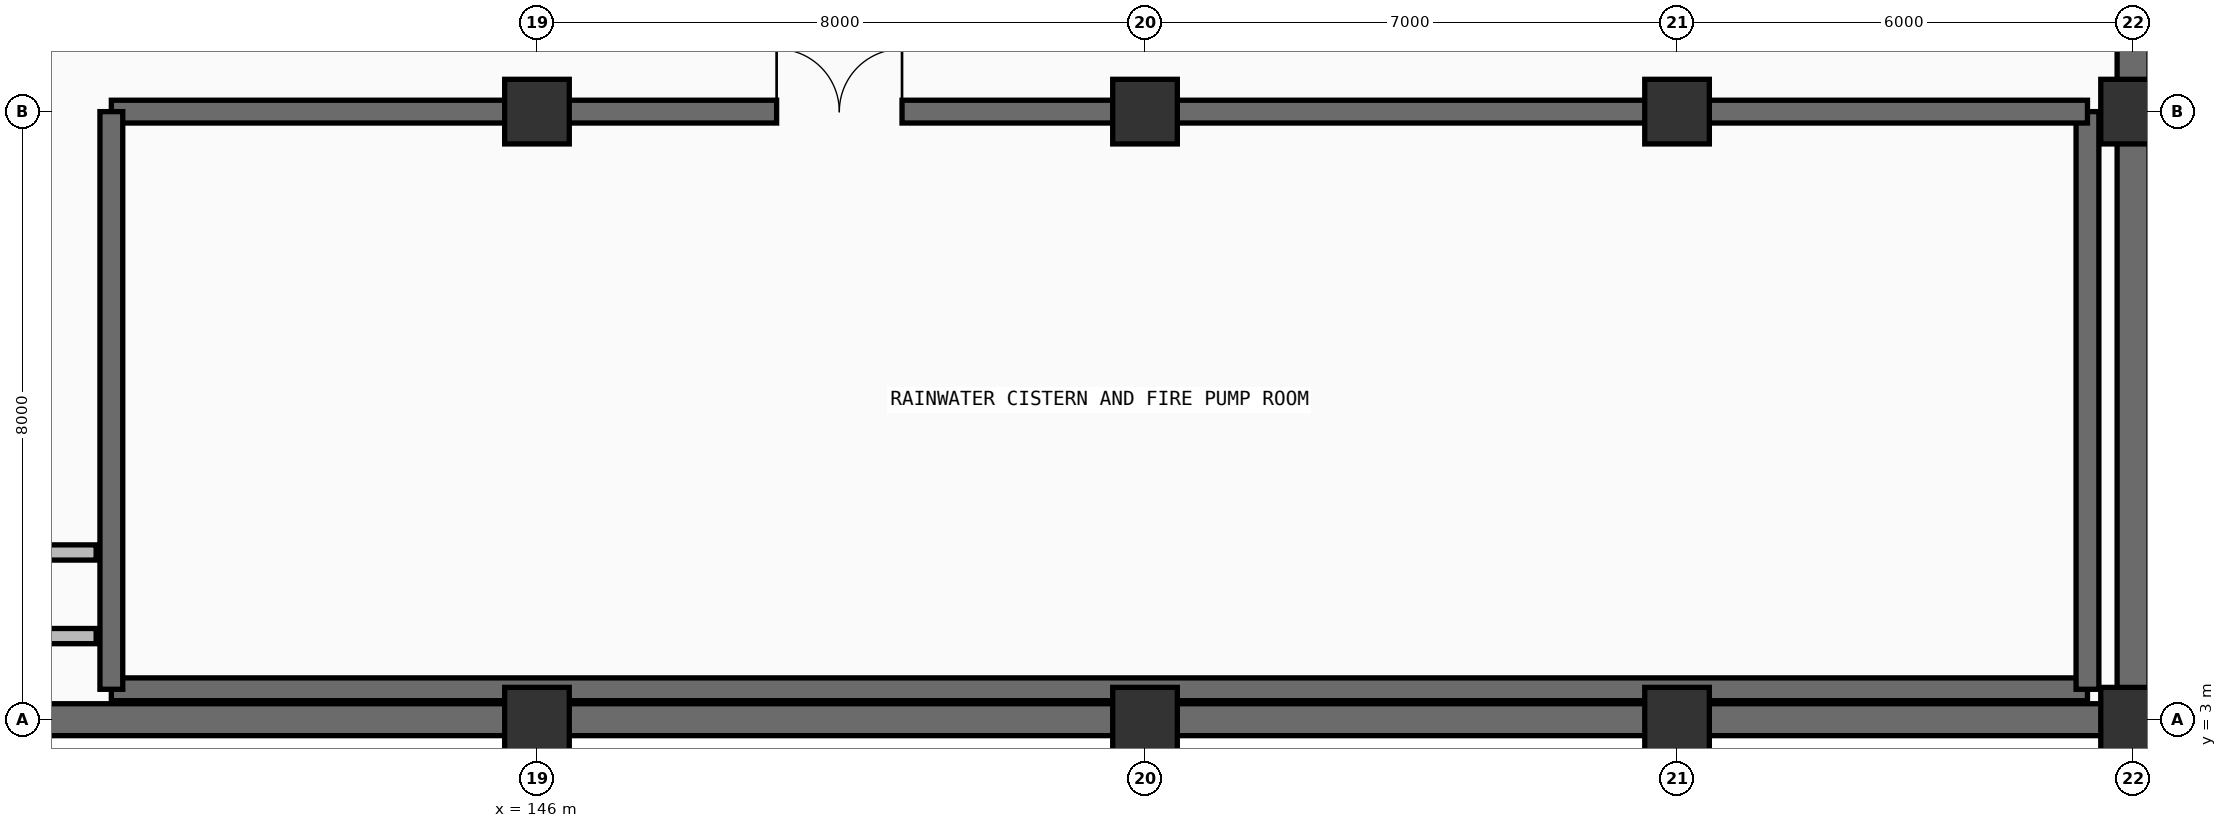
"""IFC4 building model, lengths in metres.
Left out: names, types, materials, properties, quantities, classifications, styles, units other than length and angle.
Written with IfcOpenShell. Run it as: python <this file> out.ifc"""

import sys

from ifc_helpers import new_model, si_unit, direction, frame, frame_2d, origin, origin_2d, place, context, subcontext, project, spatial, rectangle, extrude, element, fill, save


model = new_model("IFC4")
c1 = context("Model", 3, precision=1e-05, world=origin(), true_north=direction((0.0, 1.0)))
c2 = subcontext(c1, "Body", "Model", "MODEL_VIEW")
j1 = project(units=[si_unit("LENGTHUNIT", "METRE"), si_unit("PLANEANGLEUNIT", "RADIAN")], contexts=[c1])
p1 = place(None, origin())
s1 = spatial("IfcSite", under=j1, at=p1, CompositionType="ELEMENT")
p2 = place(p1, origin())
s2 = spatial("IfcBuilding", under=s1, at=p2, CompositionType="ELEMENT")
p3 = place(p2, frame((0.0, 0.0, -4.5)))
s3 = spatial("IfcBuildingStorey", under=s2, at=p3, CompositionType="ELEMENT", Elevation=-4.5)
for number, where, z_axis, x_axis in (
    (1, (146.0, 3.0, -0.6), (0.0, 0.0, 1.0), (1.0, 0.0, 0.0)),
    (2, (146.0, 11.0, -0.6), (0.0, 0.0, 1.0), (1.0, 0.0, 0.0)),
    (3, (154.0, 3.0, -0.6), (0.0, 0.0, 1.0), (1.0, 0.0, 0.0)),
    (4, (154.0, 11.0, -0.6), (0.0, 0.0, 1.0), (1.0, 0.0, 0.0)),
    (5, (161.0, 3.0, -0.6), (0.0, 0.0, 1.0), (1.0, 0.0, 0.0)),
    (6, (161.0, 11.0, -0.6), (0.0, 0.0, 1.0), (1.0, 0.0, 0.0)),
    (7, (167.0, 3.0, -0.6), (0.0, 0.0, 1.0), (1.0, 0.0, 0.0)),
    (8, (167.0, 11.0, -0.6), (0.0, 0.0, 1.0), (1.0, 0.0, 0.0)),
):
    element("IfcColumn", number, at=place(p3, frame(where, z_axis=z_axis, x_axis=x_axis)), inside=s3, PredefinedType="COLUMN", context=c2, shape_type="SweptSolid", body=[
        extrude(rectangle(XDim=0.85, YDim=0.85, at=origin_2d()), origin(), (0.0, 0.0, 1.0), 5.1),
    ])
for number, where, z_axis, x_axis in (
    (9, (167.0, 19.0, 0.0), (0.0, 0.0, 1.0), (0.0, -1.0, 0.0)),
    (10, (167.0, 11.0, 0.0), (0.0, 0.0, 1.0), (0.0, -1.0, 0.0)),
):
    element("IfcWall", number, at=place(p3, frame(where, z_axis=z_axis, x_axis=x_axis)), inside=s3, PredefinedType="USERDEFINED", context=c2, shape_type="SweptSolid", body=[
        extrude(rectangle(XDim=8.0, YDim=0.42, at=frame_2d((4.0, 0.0))), origin(), (0.0, 0.0, 1.0), 4.5),
    ])
p4 = place(p3, frame((167.0, 3.0, 0.0), z_axis=(0.0, 0.0, 1.0), x_axis=(-1.0, 0.0, 0.0)))
e11 = element("IfcWall", 11, at=p4, inside=s3, PredefinedType="USERDEFINED", context=c2, shape_type="SweptSolid", body=[
    extrude(rectangle(XDim=6.0, YDim=0.42, at=frame_2d((3.0, 0.0))), origin(), (0.0, 0.0, 1.0), 4.5),
])
p5 = place(p3, frame((161.0, 3.0, 0.0), z_axis=(0.0, 0.0, 1.0), x_axis=(-1.0, 0.0, 0.0)))
e12 = element("IfcWall", 12, at=p5, inside=s3, PredefinedType="USERDEFINED", context=c2, shape_type="SweptSolid", body=[
    extrude(rectangle(XDim=7.0, YDim=0.42, at=frame_2d((3.5, 0.0))), origin(), (0.0, 0.0, 1.0), 4.5),
])
for number, where, z_axis, x_axis in (
    (13, (154.0, 3.0, 0.0), (0.0, 0.0, 1.0), (-1.0, 0.0, 0.0)),
    (14, (146.0, 3.0, 0.0), (0.0, 0.0, 1.0), (-1.0, 0.0, 0.0)),
):
    element("IfcWall", number, at=place(p3, frame(where, z_axis=z_axis, x_axis=x_axis)), inside=s3, PredefinedType="USERDEFINED", context=c2, shape_type="SweptSolid", body=[
        extrude(rectangle(XDim=8.0, YDim=0.42, at=frame_2d((4.0, 0.0))), origin(), (0.0, 0.0, 1.0), 4.5),
    ])
p6 = place(p3, frame((140.4, 3.4, 0.0), z_axis=(0.0, 0.0, 1.0), x_axis=(1.0, 0.0, 0.0)))
e15 = element("IfcWall", 15, at=p6, inside=s3, PredefinedType="SHEAR", context=c2, shape_type="SweptSolid", body=[
    extrude(rectangle(XDim=26.0, YDim=0.3, at=frame_2d((13.0, 0.0))), origin(), (0.0, 0.0, 1.0), 4.2),
])
p7 = place(p3, frame((166.4, 3.4, 0.0), z_axis=(0.0, 0.0, 1.0), x_axis=(0.0, 1.0, 0.0)))
e16 = element("IfcWall", 16, at=p7, inside=s3, PredefinedType="SHEAR", context=c2, shape_type="SweptSolid", body=[
    extrude(rectangle(XDim=7.6, YDim=0.3, at=frame_2d((3.8, 0.0))), origin(), (0.0, 0.0, 1.0), 4.2),
])
p8 = place(p3, frame((140.4, 11.0, 0.0), z_axis=(0.0, 0.0, 1.0), x_axis=(1.0, 0.0, 0.0)))
e17 = element("IfcWall", 17, at=p8, inside=s3, PredefinedType="SHEAR", context=c2, shape_type="SweptSolid", body=[
    extrude(rectangle(XDim=26.0, YDim=0.3, at=frame_2d((13.0, 0.0))), origin(), (0.0, 0.0, 1.0), 4.2),
])
p9 = place(p8, frame((8.753, 0.0, 0.0)))
e18 = element("IfcOpeningElement", 18, at=p9, cuts=e17, PredefinedType="OPENING", context=c2, shape_type="SweptSolid", body=[
    extrude(rectangle(XDim=1.65, YDim=2.25, at=frame_2d((0.825, 1.125))), frame((0.0, 0.16, 0.0), z_axis=(0.0, -1.0, 0.0), x_axis=(1.0, 0.0, 0.0)), (0.0, 0.0, 1.0), 0.32),
])
p10 = place(p3, frame((140.4, 3.4, 0.0), z_axis=(0.0, 0.0, 1.0), x_axis=(0.0, 1.0, 0.0)))
e19 = element("IfcWall", 19, at=p10, inside=s3, PredefinedType="SHEAR", context=c2, shape_type="SweptSolid", body=[
    extrude(rectangle(XDim=7.6, YDim=0.3, at=frame_2d((3.8, 0.0))), origin(), (0.0, 0.0, 1.0), 4.2),
])
for number, where, z_axis, x_axis in (
    (20, (139.1, 4.1, 0.0), (0.0, 0.0, 1.0), (1.0, 0.0, 0.0)),
    (21, (139.1, 5.2, 0.0), (0.0, 0.0, 1.0), (1.0, 0.0, 0.0)),
):
    element("IfcWall", number, at=place(p3, frame(where, z_axis=z_axis, x_axis=x_axis)), inside=s3, PredefinedType="PARTITIONING", context=c2, shape_type="SweptSolid", body=[
        extrude(rectangle(XDim=1.1, YDim=0.2, at=frame_2d((0.55, 0.0))), origin(), (0.0, 0.0, 1.0), 4.2),
    ])
p11 = place(p9, origin())
e22 = element("IfcDoor", 22, at=p11, inside=s3, OperationType="DOUBLE_DOOR_SINGLE_SWING", PredefinedType="DOOR", context=c2, shape_type="SweptSolid", body=[
    extrude(rectangle(XDim=1.65, YDim=2.25, at=frame_2d((0.825, 1.125))), frame((0.0, 0.025, 0.0), z_axis=(0.0, -1.0, 0.0), x_axis=(1.0, 0.0, 0.0)), (0.0, 0.0, 1.0), 0.05),
])
fill(e18, e22)
save(model, sys.argv[1])
